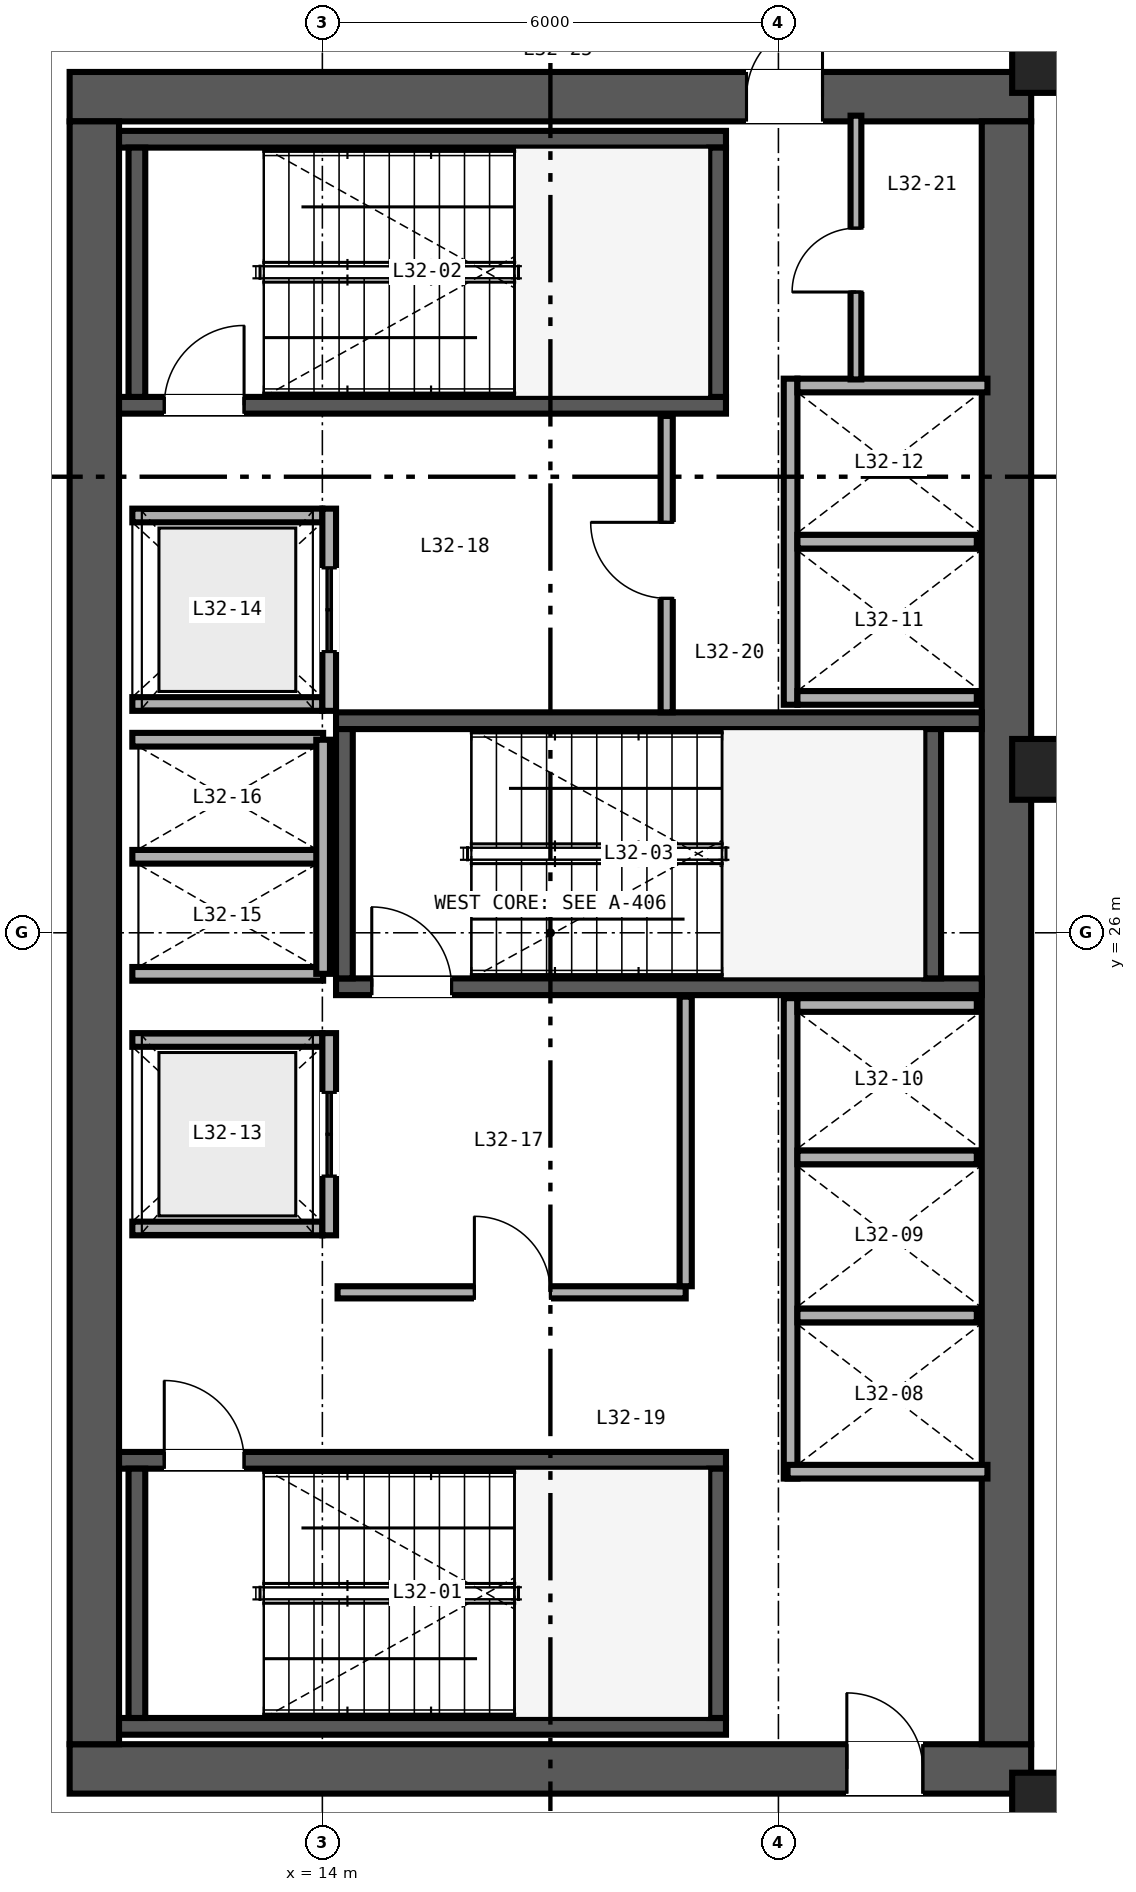
"""IFC4 building model, lengths in metres.
Left out: names, types, materials, properties, quantities, classifications, styles, units other than length and angle.
Written with IfcOpenShell. Run it as: python <this file> out.ifc"""

import sys

from ifc_helpers import new_model, si_unit, direction, frame, frame_2d, origin, origin_2d, place, context, subcontext, project, spatial, rectangle, hollow_rectangle, extrude, source, transform, mapped, element, fill, save


model = new_model("IFC4")
c1 = context("Model", 3, precision=1e-05, world=origin(), true_north=direction((0.0, 1.0)))
c2 = subcontext(c1, "Body", "Model", "MODEL_VIEW")
j1 = project(units=[si_unit("LENGTHUNIT", "METRE"), si_unit("PLANEANGLEUNIT", "RADIAN")], contexts=[c1])
p1 = place(None, origin())
s1 = spatial("IfcSite", under=j1, at=p1, CompositionType="ELEMENT")
p2 = place(p1, origin())
s2 = spatial("IfcBuilding", under=s1, at=p2, CompositionType="ELEMENT")
p3 = place(p2, frame((0.0, 0.0, 129.6)))
s3 = spatial("IfcBuildingStorey", under=s2, at=p3, CompositionType="ELEMENT", Elevation=129.6)
p4 = place(p3, frame((10.675, 15.0, 0.0), z_axis=(0.0, 0.0, 1.0), x_axis=(1.0, 0.0, 0.0)))
e1 = element("IfcWall", 1, at=p4, inside=s3, PredefinedType="SHEAR", context=c2, shape_type="SweptSolid", body=[
    extrude(rectangle(XDim=12.65, YDim=0.65, at=frame_2d((6.325, 0.0))), origin(), (0.0, 0.0, 1.0), 3.36),
])
p5 = place(p4, frame((10.225, 0.0, 0.0)))
e2 = element("IfcOpeningElement", 2, at=p5, cuts=e1, PredefinedType="OPENING", context=c2, shape_type="SweptSolid", body=[
    extrude(rectangle(XDim=1.0, YDim=2.15, at=frame_2d((0.5, 1.075))), frame((0.0, 0.335, 0.0), z_axis=(0.0, -1.0, 0.0), x_axis=(1.0, 0.0, 0.0)), (0.0, 0.0, 1.0), 0.67),
])
p6 = place(p3, frame((10.675, 37.0, 0.0), z_axis=(0.0, 0.0, 1.0), x_axis=(1.0, 0.0, 0.0)))
e3 = element("IfcWall", 3, at=p6, inside=s3, PredefinedType="SHEAR", context=c2, shape_type="SweptSolid", body=[
    extrude(rectangle(XDim=12.65, YDim=0.65, at=frame_2d((6.325, 0.0))), origin(), (0.0, 0.0, 1.0), 3.36),
])
p7 = place(p6, frame((8.905, 0.0, 0.0)))
e4 = element("IfcOpeningElement", 4, at=p7, cuts=e3, PredefinedType="OPENING", context=c2, shape_type="SweptSolid", body=[
    extrude(rectangle(XDim=1.0, YDim=2.15, at=frame_2d((0.5, 1.075))), frame((0.0, 0.335, 0.0), z_axis=(0.0, -1.0, 0.0), x_axis=(1.0, 0.0, 0.0)), (0.0, 0.0, 1.0), 0.67),
])
for number, where, z_axis, x_axis in (
    (5, (11.0, 15.325, 0.0), (0.0, 0.0, 1.0), (0.0, 1.0, 0.0)),
    (6, (23.0, 15.325, 0.0), (0.0, 0.0, 1.0), (0.0, 1.0, 0.0)),
):
    element("IfcWall", number, at=place(p3, frame(where, z_axis=z_axis, x_axis=x_axis)), inside=s3, PredefinedType="SHEAR", context=c2, shape_type="SweptSolid", body=[
        extrude(rectangle(XDim=21.35, YDim=0.65, at=frame_2d((10.675, 0.0))), origin(), (0.0, 0.0, 1.0), 3.36),
    ])
p8 = place(p3, frame((11.325, 15.56, 0.0), z_axis=(0.0, 0.0, 1.0), x_axis=(1.0, 0.0, 0.0)))
e7 = element("IfcWall", 7, at=p8, inside=s3, PredefinedType="SHEAR", context=c2, shape_type="SweptSolid", body=[
    extrude(rectangle(XDim=7.985, YDim=0.22, at=frame_2d((3.993, 0.0))), origin(), (0.0, 0.0, 1.0), 3.4),
])
p9 = place(p3, frame((11.325, 19.06, 0.0), z_axis=(0.0, 0.0, 1.0), x_axis=(1.0, 0.0, 0.0)))
e8 = element("IfcWall", 8, at=p9, inside=s3, PredefinedType="SHEAR", context=c2, shape_type="SweptSolid", body=[
    extrude(rectangle(XDim=7.985, YDim=0.22, at=frame_2d((3.993, 0.0))), origin(), (0.0, 0.0, 1.0), 3.4),
])
p10 = place(p9, frame((0.595, 0.0, 0.0)))
e9 = element("IfcOpeningElement", 9, at=p10, cuts=e8, PredefinedType="OPENING", context=c2, shape_type="SweptSolid", body=[
    extrude(rectangle(XDim=1.05, YDim=2.15, at=frame_2d((0.525, 1.075))), frame((0.0, 0.12, 0.0), z_axis=(0.0, -1.0, 0.0), x_axis=(1.0, 0.0, 0.0)), (0.0, 0.0, 1.0), 0.24),
])
for number, where, z_axis, x_axis in (
    (10, (11.56, 15.67, 0.0), (0.0, 0.0, 1.0), (0.0, 1.0, 0.0)),
    (11, (19.2, 15.67, 0.0), (0.0, 0.0, 1.0), (0.0, 1.0, 0.0)),
):
    element("IfcWall", number, at=place(p3, frame(where, z_axis=z_axis, x_axis=x_axis)), inside=s3, PredefinedType="SHEAR", context=c2, shape_type="SweptSolid", body=[
        extrude(rectangle(XDim=3.28, YDim=0.22, at=frame_2d((1.64, 0.0))), origin(), (0.0, 0.0, 1.0), 3.4),
    ])
p11 = place(p3, frame((11.325, 32.94, 0.0), z_axis=(0.0, 0.0, 1.0), x_axis=(1.0, 0.0, 0.0)))
e12 = element("IfcWall", 12, at=p11, inside=s3, PredefinedType="SHEAR", context=c2, shape_type="SweptSolid", body=[
    extrude(rectangle(XDim=7.985, YDim=0.22, at=frame_2d((3.993, 0.0))), origin(), (0.0, 0.0, 1.0), 3.4),
])
p12 = place(p11, frame((0.595, 0.0, 0.0)))
e13 = element("IfcOpeningElement", 13, at=p12, cuts=e12, PredefinedType="OPENING", context=c2, shape_type="SweptSolid", body=[
    extrude(rectangle(XDim=1.05, YDim=2.15, at=frame_2d((0.525, 1.075))), frame((0.0, 0.12, 0.0), z_axis=(0.0, -1.0, 0.0), x_axis=(1.0, 0.0, 0.0)), (0.0, 0.0, 1.0), 0.24),
])
p13 = place(p3, frame((11.325, 36.44, 0.0), z_axis=(0.0, 0.0, 1.0), x_axis=(1.0, 0.0, 0.0)))
e14 = element("IfcWall", 14, at=p13, inside=s3, PredefinedType="SHEAR", context=c2, shape_type="SweptSolid", body=[
    extrude(rectangle(XDim=7.985, YDim=0.22, at=frame_2d((3.993, 0.0))), origin(), (0.0, 0.0, 1.0), 3.4),
])
for number, where, z_axis, x_axis in (
    (15, (11.56, 33.05, 0.0), (0.0, 0.0, 1.0), (0.0, 1.0, 0.0)),
    (16, (19.2, 33.05, 0.0), (0.0, 0.0, 1.0), (0.0, 1.0, 0.0)),
):
    element("IfcWall", number, at=place(p3, frame(where, z_axis=z_axis, x_axis=x_axis)), inside=s3, PredefinedType="SHEAR", context=c2, shape_type="SweptSolid", body=[
        extrude(rectangle(XDim=3.28, YDim=0.22, at=frame_2d((1.64, 0.0))), origin(), (0.0, 0.0, 1.0), 3.4),
    ])
p14 = place(p3, frame((14.18, 25.29, 0.0), z_axis=(0.0, 0.0, 1.0), x_axis=(1.0, 0.0, 0.0)))
e17 = element("IfcWall", 17, at=p14, inside=s3, PredefinedType="SHEAR", context=c2, shape_type="SweptSolid", body=[
    extrude(rectangle(XDim=8.495, YDim=0.22, at=frame_2d((4.248, 0.0))), origin(), (0.0, 0.0, 1.0), 3.4),
])
p15 = place(p14, frame((0.47, 0.0, 0.0)))
e18 = element("IfcOpeningElement", 18, at=p15, cuts=e17, PredefinedType="OPENING", context=c2, shape_type="SweptSolid", body=[
    extrude(rectangle(XDim=1.05, YDim=2.15, at=frame_2d((0.525, 1.075))), frame((0.0, 0.12, 0.0), z_axis=(0.0, -1.0, 0.0), x_axis=(1.0, 0.0, 0.0)), (0.0, 0.0, 1.0), 0.24),
])
p16 = place(p3, frame((14.18, 28.79, 0.0), z_axis=(0.0, 0.0, 1.0), x_axis=(1.0, 0.0, 0.0)))
e19 = element("IfcWall", 19, at=p16, inside=s3, PredefinedType="SHEAR", context=c2, shape_type="SweptSolid", body=[
    extrude(rectangle(XDim=8.495, YDim=0.22, at=frame_2d((4.248, 0.0))), origin(), (0.0, 0.0, 1.0), 3.4),
])
for number, where, z_axis, x_axis in (
    (20, (14.29, 25.4, 0.0), (0.0, 0.0, 1.0), (0.0, 1.0, 0.0)),
    (21, (22.03, 25.4, 0.0), (0.0, 0.0, 1.0), (0.0, 1.0, 0.0)),
):
    element("IfcWall", number, at=place(p3, frame(where, z_axis=z_axis, x_axis=x_axis)), inside=s3, PredefinedType="SHEAR", context=c2, shape_type="SweptSolid", body=[
        extrude(rectangle(XDim=3.28, YDim=0.22, at=frame_2d((1.64, 0.0))), origin(), (0.0, 0.0, 1.0), 3.4),
    ])
m1 = source(origin(), c2, "Body", "SweptSolid", [
    extrude(hollow_rectangle(XDim=0.85, YDim=0.8, WallThickness=0.032, at=origin_2d()), origin(), (0.0, 0.0, 1.0), 3.36),
])
for number, where, z_axis, x_axis in (
    (22, (23.5, 14.55, 0.0), (0.0, 0.0, 1.0), (1.0, 0.0, 0.0)),
    (23, (23.5, 28.15, 0.0), (0.0, 0.0, 1.0), (1.0, 0.0, 0.0)),
    (24, (23.5, 37.45, 0.0), (0.0, 0.0, 1.0), (1.0, 0.0, 0.0)),
):
    element("IfcColumn", number, at=place(p3, frame(where, z_axis=z_axis, x_axis=x_axis)), inside=s3, PredefinedType="COLUMN", context=c2, shape_type="MappedRepresentation", body=[
        mapped(m1, transform((0.0, 0.0, 0.0), scale=1.0)),
    ])
p17 = place(p3, frame((20.16, 18.82, 0.0), z_axis=(0.0, 0.0, 1.0), x_axis=(0.0, 1.0, 0.0)))
e25 = element("IfcWall", 25, at=p17, inside=s3, PredefinedType="SOLIDWALL", context=c2, shape_type="SweptSolid", body=[
    extrude(rectangle(XDim=6.32, YDim=0.18, at=frame_2d((3.16, 0.0))), origin(), (0.0, 0.0, 1.0), 2.36),
])
p18 = place(p3, frame((20.12, 18.91, 0.0), z_axis=(0.0, 0.0, 1.0), x_axis=(1.0, 0.0, 0.0)))
e26 = element("IfcWall", 26, at=p18, inside=s3, PredefinedType="SOLIDWALL", context=c2, shape_type="SweptSolid", body=[
    extrude(rectangle(XDim=2.63, YDim=0.18, at=frame_2d((1.315, 0.0))), origin(), (0.0, 0.0, 1.0), 3.36),
])
p19 = place(p3, frame((20.25, 25.05, 0.0), z_axis=(0.0, 0.0, 1.0), x_axis=(1.0, 0.0, 0.0)))
e27 = element("IfcWall", 27, at=p19, inside=s3, PredefinedType="SOLIDWALL", context=c2, shape_type="SweptSolid", body=[
    extrude(rectangle(XDim=2.36, YDim=0.18, at=frame_2d((1.18, 0.0))), origin(), (0.0, 0.0, 1.0), 3.36),
])
p20 = place(p3, frame((20.25, 20.965, 0.0), z_axis=(0.0, 0.0, 1.0), x_axis=(1.0, 0.0, 0.0)))
e28 = element("IfcWall", 28, at=p20, inside=s3, PredefinedType="SOLIDWALL", context=c2, shape_type="SweptSolid", body=[
    extrude(rectangle(XDim=2.36, YDim=0.18, at=frame_2d((1.18, 0.0))), origin(), (0.0, 0.0, 1.0), 2.36),
])
p21 = place(p3, frame((20.25, 23.045, 0.0), z_axis=(0.0, 0.0, 1.0), x_axis=(1.0, 0.0, 0.0)))
e29 = element("IfcWall", 29, at=p21, inside=s3, PredefinedType="SOLIDWALL", context=c2, shape_type="SweptSolid", body=[
    extrude(rectangle(XDim=2.36, YDim=0.18, at=frame_2d((1.18, 0.0))), origin(), (0.0, 0.0, 1.0), 3.36),
])
p22 = place(p3, frame((20.16, 29.0, 0.0), z_axis=(0.0, 0.0, 1.0), x_axis=(0.0, 1.0, 0.0)))
e30 = element("IfcWall", 30, at=p22, inside=s3, PredefinedType="SOLIDWALL", context=c2, shape_type="SweptSolid", body=[
    extrude(rectangle(XDim=4.29, YDim=0.18, at=frame_2d((2.145, 0.0))), origin(), (0.0, 0.0, 1.0), 3.36),
])
p23 = place(p3, frame((20.25, 29.09, 0.0), z_axis=(0.0, 0.0, 1.0), x_axis=(1.0, 0.0, 0.0)))
e31 = element("IfcWall", 31, at=p23, inside=s3, PredefinedType="SOLIDWALL", context=c2, shape_type="SweptSolid", body=[
    extrude(rectangle(XDim=2.36, YDim=0.18, at=frame_2d((1.18, 0.0))), origin(), (0.0, 0.0, 1.0), 3.36),
])
p24 = place(p3, frame((20.25, 33.2, 0.0), z_axis=(0.0, 0.0, 1.0), x_axis=(1.0, 0.0, 0.0)))
e32 = element("IfcWall", 32, at=p24, inside=s3, PredefinedType="SOLIDWALL", context=c2, shape_type="SweptSolid", body=[
    extrude(rectangle(XDim=2.5, YDim=0.18, at=frame_2d((1.25, 0.0))), origin(), (0.0, 0.0, 1.0), 3.36),
])
p25 = place(p3, frame((20.25, 31.145, 0.0), z_axis=(0.0, 0.0, 1.0), x_axis=(1.0, 0.0, 0.0)))
e33 = element("IfcWall", 33, at=p25, inside=s3, PredefinedType="SOLIDWALL", context=c2, shape_type="SweptSolid", body=[
    extrude(rectangle(XDim=2.36, YDim=0.18, at=frame_2d((1.18, 0.0))), origin(), (0.0, 0.0, 1.0), 3.36),
])
for number, where, z_axis, x_axis in (
    (34, (11.5, 22.11, 0.0), (0.0, 0.0, 1.0), (1.0, 0.0, 0.0)),
    (35, (11.5, 24.59, 0.0), (0.0, 0.0, 1.0), (1.0, 0.0, 0.0)),
):
    element("IfcWall", number, at=place(p3, frame(where, z_axis=z_axis, x_axis=x_axis)), inside=s3, PredefinedType="SOLIDWALL", context=c2, shape_type="SweptSolid", body=[
        extrude(rectangle(XDim=2.5, YDim=0.18, at=frame_2d((1.25, 0.0))), origin(), (0.0, 0.0, 1.0), 3.36),
    ])
p26 = place(p3, frame((14.09, 22.02, 0.0), z_axis=(0.0, 0.0, 1.0), x_axis=(0.0, 1.0, 0.0)))
e36 = element("IfcWall", 36, at=p26, inside=s3, PredefinedType="SOLIDWALL", context=c2, shape_type="SweptSolid", body=[
    extrude(rectangle(XDim=2.66, YDim=0.18, at=frame_2d((1.33, 0.0))), origin(), (0.0, 0.0, 1.0), 3.36),
])
p27 = place(p26, frame((0.78, 0.0, 0.0)))
e37 = element("IfcOpeningElement", 37, at=p27, cuts=e36, PredefinedType="OPENING", context=c2, shape_type="SweptSolid", body=[
    extrude(rectangle(XDim=1.1, YDim=2.2, at=frame_2d((0.55, 1.1))), frame((0.0, 0.1, 0.0), z_axis=(0.0, -1.0, 0.0), x_axis=(1.0, 0.0, 0.0)), (0.0, 0.0, 1.0), 0.2),
])
for number, where, z_axis, x_axis in (
    (38, (11.5, 29.01, 0.0), (0.0, 0.0, 1.0), (1.0, 0.0, 0.0)),
    (39, (11.5, 31.49, 0.0), (0.0, 0.0, 1.0), (1.0, 0.0, 0.0)),
):
    element("IfcWall", number, at=place(p3, frame(where, z_axis=z_axis, x_axis=x_axis)), inside=s3, PredefinedType="SOLIDWALL", context=c2, shape_type="SweptSolid", body=[
        extrude(rectangle(XDim=2.5, YDim=0.18, at=frame_2d((1.25, 0.0))), origin(), (0.0, 0.0, 1.0), 3.36),
    ])
p28 = place(p3, frame((14.09, 28.92, 0.0), z_axis=(0.0, 0.0, 1.0), x_axis=(0.0, 1.0, 0.0)))
e40 = element("IfcWall", 40, at=p28, inside=s3, PredefinedType="SOLIDWALL", context=c2, shape_type="SweptSolid", body=[
    extrude(rectangle(XDim=2.66, YDim=0.18, at=frame_2d((1.33, 0.0))), origin(), (0.0, 0.0, 1.0), 3.36),
])
p29 = place(p28, frame((0.78, 0.0, 0.0)))
e41 = element("IfcOpeningElement", 41, at=p29, cuts=e40, PredefinedType="OPENING", context=c2, shape_type="SweptSolid", body=[
    extrude(rectangle(XDim=1.1, YDim=2.2, at=frame_2d((0.55, 1.1))), frame((0.0, 0.1, 0.0), z_axis=(0.0, -1.0, 0.0), x_axis=(1.0, 0.0, 0.0)), (0.0, 0.0, 1.0), 0.2),
])
for number, where, z_axis, x_axis in (
    (42, (11.5, 25.46, 0.0), (0.0, 0.0, 1.0), (1.0, 0.0, 0.0)),
    (43, (11.5, 27.0, 0.0), (0.0, 0.0, 1.0), (1.0, 0.0, 0.0)),
    (44, (11.5, 28.54, 0.0), (0.0, 0.0, 1.0), (1.0, 0.0, 0.0)),
):
    element("IfcWall", number, at=place(p3, frame(where, z_axis=z_axis, x_axis=x_axis)), inside=s3, PredefinedType="SOLIDWALL", context=c2, shape_type="SweptSolid", body=[
        extrude(rectangle(XDim=2.51, YDim=0.18, at=frame_2d((1.255, 0.0))), origin(), (0.0, 0.0, 1.0), 3.36),
    ])
p30 = place(p3, frame((14.01, 25.46, 0.0), z_axis=(0.0, 0.0, 1.0), x_axis=(0.0, 1.0, 0.0)))
e45 = element("IfcWall", 45, at=p30, inside=s3, PredefinedType="SOLIDWALL", context=c2, shape_type="SweptSolid", body=[
    extrude(rectangle(XDim=3.08, YDim=0.18, at=frame_2d((1.54, 0.0))), origin(), (0.0, 0.0, 1.0), 3.36),
])
p31 = place(p3, frame((14.2, 21.27, 0.0), z_axis=(0.0, 0.0, 1.0), x_axis=(1.0, 0.0, 0.0)))
e46 = element("IfcWall", 46, at=p31, inside=s3, PredefinedType="PARTITIONING", context=c2, shape_type="SweptSolid", body=[
    extrude(rectangle(XDim=4.58, YDim=0.16, at=frame_2d((2.29, 0.0))), origin(), (0.0, 0.0, 1.0), 3.36),
])
p32 = place(p31, frame((1.8, 0.0, 0.0)))
e47 = element("IfcOpeningElement", 47, at=p32, cuts=e46, PredefinedType="OPENING", context=c2, shape_type="SweptSolid", body=[
    extrude(rectangle(XDim=1.0, YDim=2.15, at=frame_2d((0.5, 1.075))), frame((0.0, 0.09, 0.0), z_axis=(0.0, -1.0, 0.0), x_axis=(1.0, 0.0, 0.0)), (0.0, 0.0, 1.0), 0.18),
])
p33 = place(p3, frame((18.78, 21.35, 0.0), z_axis=(0.0, 0.0, 1.0), x_axis=(0.0, 1.0, 0.0)))
e48 = element("IfcWall", 48, at=p33, inside=s3, PredefinedType="PARTITIONING", context=c2, shape_type="SweptSolid", body=[
    extrude(rectangle(XDim=3.81, YDim=0.16, at=frame_2d((1.905, 0.0))), origin(), (0.0, 0.0, 1.0), 3.36),
])
p34 = place(p3, frame((18.53, 28.9, 0.0), z_axis=(0.0, 0.0, 1.0), x_axis=(0.0, 1.0, 0.0)))
e49 = element("IfcWall", 49, at=p34, inside=s3, PredefinedType="PARTITIONING", context=c2, shape_type="SweptSolid", body=[
    extrude(rectangle(XDim=3.9, YDim=0.16, at=frame_2d((1.95, 0.0))), origin(), (0.0, 0.0, 1.0), 3.36),
])
p35 = place(p34, frame((1.5, 0.0, 0.0)))
e50 = element("IfcOpeningElement", 50, at=p35, cuts=e49, PredefinedType="OPENING", context=c2, shape_type="SweptSolid", body=[
    extrude(rectangle(XDim=1.0, YDim=2.15, at=frame_2d((0.5, 1.075))), frame((0.0, 0.09, 0.0), z_axis=(0.0, -1.0, 0.0), x_axis=(1.0, 0.0, 0.0)), (0.0, 0.0, 1.0), 0.18),
])
p36 = place(p3, frame((21.02, 33.28, 0.0), z_axis=(0.0, 0.0, 1.0), x_axis=(0.0, 1.0, 0.0)))
e51 = element("IfcWall", 51, at=p36, inside=s3, PredefinedType="PARTITIONING", context=c2, shape_type="SweptSolid", body=[
    extrude(rectangle(XDim=3.47, YDim=0.142, at=frame_2d((1.735, 0.0))), origin(), (0.0, 0.0, 1.0), 3.36),
])
p37 = place(p36, frame((1.15, 0.0, 0.0)))
e52 = element("IfcOpeningElement", 52, at=p37, cuts=e51, PredefinedType="OPENING", context=c2, shape_type="SweptSolid", body=[
    extrude(rectangle(XDim=0.84, YDim=2.1, at=frame_2d((0.42, 1.05))), frame((0.0, 0.081, 0.0), z_axis=(0.0, -1.0, 0.0), x_axis=(1.0, 0.0, 0.0)), (0.0, 0.0, 1.0), 0.162),
])
m2 = source(origin(), c2, "Body", "SweptSolid", [
    extrude(rectangle(XDim=1.05, YDim=2.15, at=frame_2d((0.525, 1.075))), frame((0.0, 0.025, 0.0), z_axis=(0.0, -1.0, 0.0), x_axis=(1.0, 0.0, 0.0)), (0.0, 0.0, 1.0), 0.05),
])
p38 = place(p10, origin())
e53 = element("IfcDoor", 53, at=p38, inside=s3, OperationType="SINGLE_SWING_LEFT", PredefinedType="DOOR", context=c2, shape_type="MappedRepresentation", body=[
    mapped(m2, transform((0.0, 0.0, 0.0), scale=1.0)),
])
fill(e9, e53)
p39 = place(p12, origin())
e54 = element("IfcDoor", 54, at=p39, inside=s3, OperationType="SINGLE_SWING_RIGHT", PredefinedType="DOOR", context=c2, shape_type="MappedRepresentation", body=[
    mapped(m2, transform((0.0, 0.0, 0.0), scale=1.0)),
])
fill(e13, e54)
p40 = place(p15, origin())
e55 = element("IfcDoor", 55, at=p40, inside=s3, OperationType="SINGLE_SWING_LEFT", PredefinedType="DOOR", context=c2, shape_type="MappedRepresentation", body=[
    mapped(m2, transform((0.0, 0.0, 0.0), scale=1.0)),
])
fill(e18, e55)
m3 = source(origin(), c2, "Body", "SweptSolid", [
    extrude(rectangle(XDim=1.1, YDim=2.2, at=frame_2d((0.55, 1.1))), frame((0.0, 0.025, 0.0), z_axis=(0.0, -1.0, 0.0), x_axis=(1.0, 0.0, 0.0)), (0.0, 0.0, 1.0), 0.05),
])
p41 = place(p27, origin())
e56 = element("IfcDoor", 56, at=p41, inside=s3, OperationType="DOUBLE_DOOR_SLIDING", PredefinedType="DOOR", context=c2, shape_type="MappedRepresentation", body=[
    mapped(m3, transform((0.0, 0.0, 0.0), scale=1.0)),
])
fill(e37, e56)
p42 = place(p29, origin())
e57 = element("IfcDoor", 57, at=p42, inside=s3, OperationType="DOUBLE_DOOR_SLIDING", PredefinedType="DOOR", context=c2, shape_type="MappedRepresentation", body=[
    mapped(m3, transform((0.0, 0.0, 0.0), scale=1.0)),
])
fill(e41, e57)
m4 = source(origin(), c2, "Body", "SweptSolid", [
    extrude(rectangle(XDim=1.0, YDim=2.15, at=frame_2d((0.5, 1.075))), frame((0.0, 0.025, 0.0), z_axis=(0.0, -1.0, 0.0), x_axis=(1.0, 0.0, 0.0)), (0.0, 0.0, 1.0), 0.05),
])
p43 = place(p32, origin())
e58 = element("IfcDoor", 58, at=p43, inside=s3, OperationType="SINGLE_SWING_LEFT", PredefinedType="DOOR", context=c2, shape_type="MappedRepresentation", body=[
    mapped(m4, transform((0.0, 0.0, 0.0), scale=1.0)),
])
fill(e47, e58)
p44 = place(p35, origin())
e59 = element("IfcDoor", 59, at=p44, inside=s3, OperationType="SINGLE_SWING_RIGHT", PredefinedType="DOOR", context=c2, shape_type="MappedRepresentation", body=[
    mapped(m4, transform((0.0, 0.0, 0.0), scale=1.0)),
])
fill(e50, e59)
m5 = source(origin(), c2, "Body", "SweptSolid", [
    extrude(rectangle(XDim=0.84, YDim=2.1, at=frame_2d((0.42, 1.05))), frame((0.0, 0.025, 0.0), z_axis=(0.0, -1.0, 0.0), x_axis=(1.0, 0.0, 0.0)), (0.0, 0.0, 1.0), 0.05),
])
p45 = place(p37, origin())
e60 = element("IfcDoor", 60, at=p45, inside=s3, OperationType="SINGLE_SWING_LEFT", PredefinedType="DOOR", context=c2, shape_type="MappedRepresentation", body=[
    mapped(m5, transform((0.0, 0.0, 0.0), scale=1.0)),
])
fill(e52, e60)
p46 = place(p5, origin())
e61 = element("IfcDoor", 61, at=p46, inside=s3, OperationType="SINGLE_SWING_LEFT", PredefinedType="DOOR", context=c2, shape_type="MappedRepresentation", body=[
    mapped(m4, transform((0.0, 0.0, 0.0), scale=1.0)),
])
fill(e2, e61)
p47 = place(p7, origin())
e62 = element("IfcDoor", 62, at=p47, inside=s3, OperationType="SINGLE_SWING_RIGHT", PredefinedType="DOOR", context=c2, shape_type="MappedRepresentation", body=[
    mapped(m4, transform((0.0, 0.0, 0.0), scale=1.0)),
])
fill(e4, e62)
save(model, sys.argv[1])
